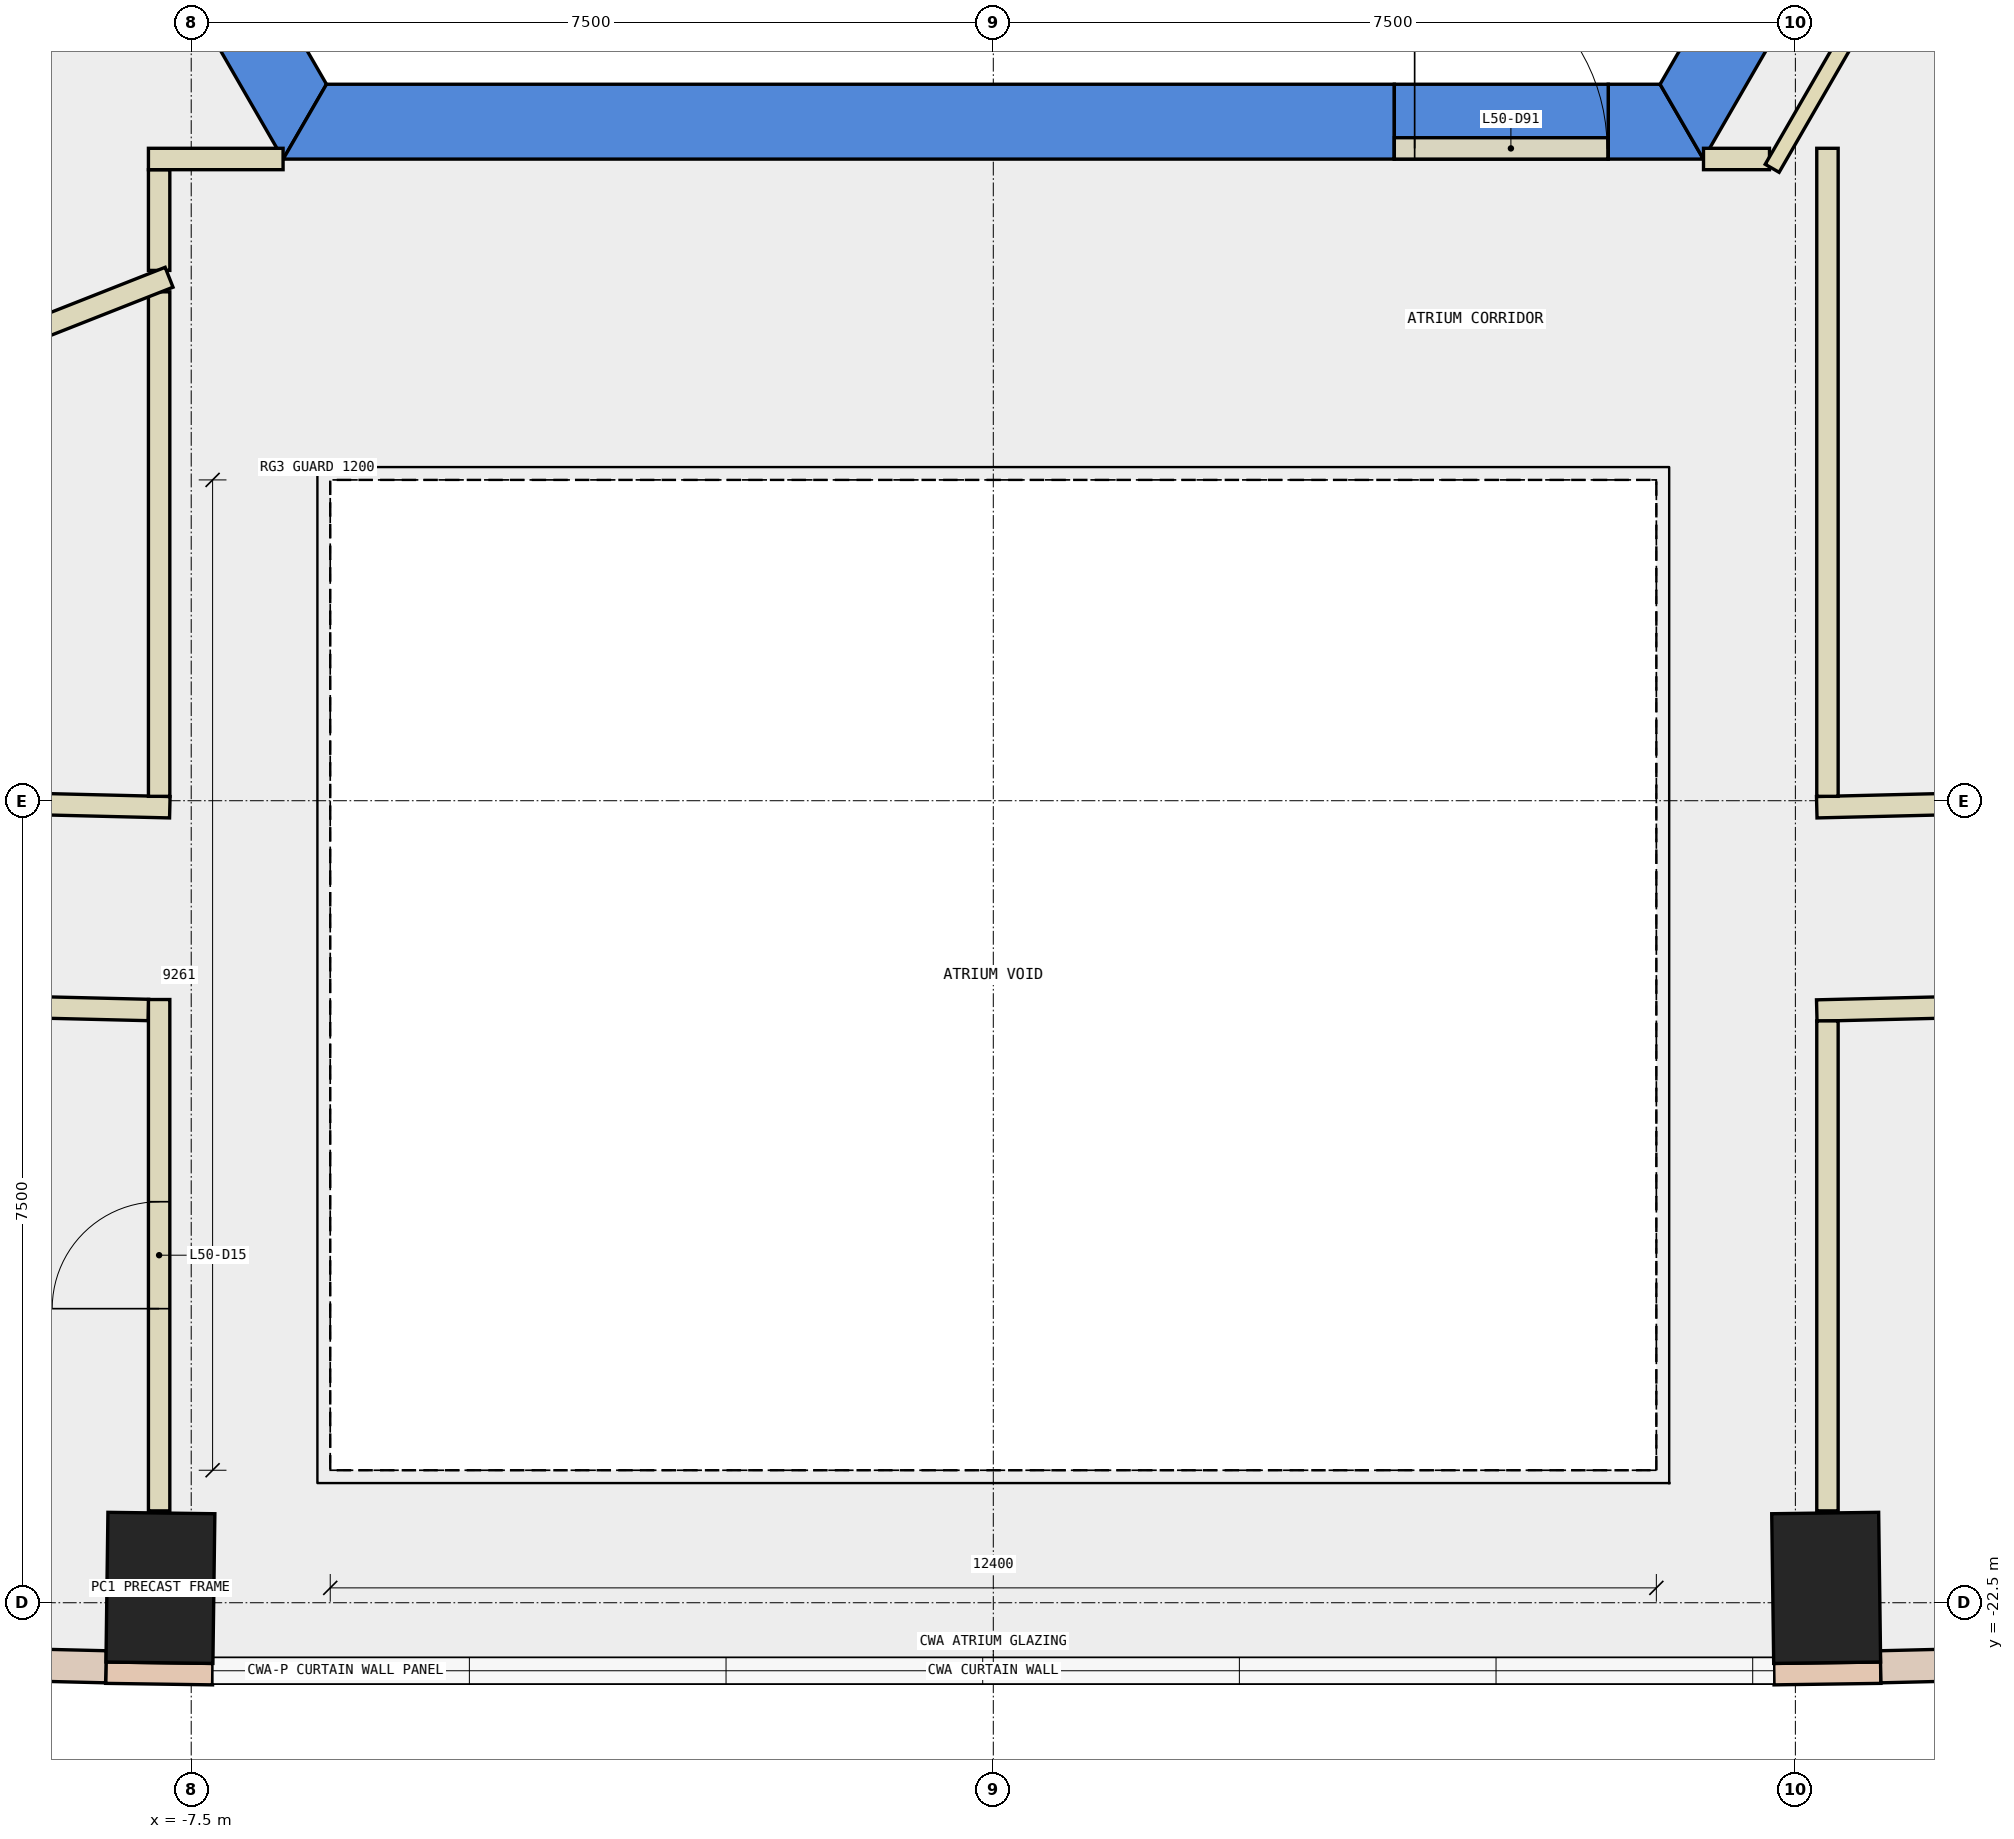
"""IFC4 building model, lengths in metres.
Left out: names, types, materials, properties, quantities, classifications, styles, units other than length and angle.
Written with IfcOpenShell. Run it as: python <this file> out.ifc"""

import sys

from ifc_helpers import new_model, si_unit, direction, frame, frame_2d, origin, origin_2d, place, context, subcontext, project, spatial, polyline, rectangle, outline, extrude, element, fill, save


model = new_model("IFC4")
c1 = context("Model", 3, precision=1e-05, world=origin(), true_north=direction((0.0, 1.0)))
c2 = subcontext(c1, "Body", "Model", "MODEL_VIEW")
j1 = project(units=[si_unit("LENGTHUNIT", "METRE"), si_unit("PLANEANGLEUNIT", "RADIAN")], contexts=[c1])
p1 = place(None, origin())
s1 = spatial("IfcSite", under=j1, at=p1, CompositionType="ELEMENT")
p2 = place(p1, origin())
s2 = spatial("IfcBuilding", under=s1, at=p2, CompositionType="ELEMENT")
p3 = place(p2, frame((0.0, 0.0, 223.4)))
s3 = spatial("IfcBuildingStorey", under=s2, at=p3, CompositionType="ELEMENT", Elevation=223.4)
for number, where, z_axis, x_axis in (
    (1, (-7.788, -22.361, -0.4), (0.0, 0.0, 1.0), (-1.0, 0.013, 0.0)),
    (2, (7.788, -22.361, -0.4), (0.0, 0.0, 1.0), (1.0, 0.013, 0.0)),
):
    element("IfcColumn", number, at=place(p3, frame(where, z_axis=z_axis, x_axis=x_axis)), inside=s3, PredefinedType="COLUMN", context=c2, shape_type="SweptSolid", body=[
        extrude(rectangle(XDim=1.0, YDim=1.4, at=origin_2d()), origin(), (0.0, 0.0, 1.0), 4.2),
    ])
p4 = place(p3, frame((0.0, 0.0, -0.4)))
e3 = element("IfcWall", 3, at=p4, inside=s3, PredefinedType="SHEAR", context=c2, shape_type="SweptSolid", body=[
    extrude(outline(polyline([(-13.279, 2.5), (-6.64, -9.0), (-6.235, -8.3), (-12.471, 2.5), (-13.279, 2.5)])), origin(), (0.0, 0.0, 1.0), 4.2),
])
p5 = place(p3, frame((0.0, 0.0, -0.4)))
e4 = element("IfcWall", 4, at=p5, inside=s3, PredefinedType="SHEAR", context=c2, shape_type="SweptSolid", body=[
    extrude(outline(polyline([(3.75, -9.0), (3.75, -8.3), (-6.235, -8.3), (-6.64, -9.0), (3.75, -9.0)])), origin(), (0.0, 0.0, 1.0), 4.2),
])
p6 = place(p3, frame((0.0, 0.0, -0.4)))
e5 = element("IfcWall", 5, at=p6, inside=s3, PredefinedType="SHEAR", context=c2, shape_type="SweptSolid", body=[
    extrude(outline(polyline([(5.75, -8.3), (5.75, -9.0), (6.64, -9.0), (6.235, -8.3), (5.75, -8.3)])), origin(), (0.0, 0.0, 1.0), 4.2),
])
p7 = place(p3, frame((0.0, 0.0, 3.6)))
e6 = element("IfcWall", 6, at=p7, inside=s3, PredefinedType="SHEAR", context=c2, shape_type="SweptSolid", body=[
    extrude(outline(polyline([(5.75, -9.0), (5.75, -8.3), (3.75, -8.3), (3.75, -9.0), (5.75, -9.0)])), origin(), (0.0, 0.0, 1.0), 0.2),
])
p8 = place(p3, frame((0.0, 0.0, -0.4)))
e7 = element("IfcWall", 7, at=p8, inside=s3, PredefinedType="SHEAR", context=c2, shape_type="SweptSolid", body=[
    extrude(outline(polyline([(6.64, -9.0), (13.279, 2.5), (12.471, 2.5), (6.235, -8.3), (6.64, -9.0)])), origin(), (0.0, 0.0, 1.0), 4.2),
])
for number, where, z_axis, x_axis in (
    (8, (8.877, -5.125, -0.4), (0.0, 0.0, 1.0), (0.866, -0.5, 0.0)),
    (9, (-8.877, -5.125, -0.4), (0.0, 0.0, 1.0), (-0.866, -0.5, 0.0)),
):
    element("IfcWall", number, at=place(p3, frame(where, z_axis=z_axis, x_axis=x_axis)), inside=s3, PredefinedType="SHEAR", context=c2, shape_type="SweptSolid", body=[
        extrude(rectangle(XDim=9.0, YDim=0.8, at=frame_2d((4.5, 0.0))), origin(), (0.0, 0.0, 1.0), 4.2),
    ])
for number, where, z_axis, x_axis in (
    (10, (-8.299, -23.154, 0.0), (0.0, 0.0, 1.0), (1.0, -0.014, 0.0)),
    (11, (7.299, -23.168, 0.0), (0.0, 0.0, 1.0), (1.0, 0.014, 0.0)),
):
    element("IfcWall", number, at=place(p3, frame(where, z_axis=z_axis, x_axis=x_axis)), inside=s3, PredefinedType="STANDARD", context=c2, shape_type="SweptSolid", body=[
        extrude(rectangle(XDim=1.0, YDim=0.2, at=frame_2d((0.5, 0.0))), origin(), (0.0, 0.0, 1.0), 3.8),
    ])
p9 = place(p3, frame((-13.681, -22.969, 0.0), z_axis=(0.0, 0.0, 1.0), x_axis=(0.999708030006, -0.024163086341, 0.0)))
e12 = element("IfcWall", 12, at=p9, inside=s3, PredefinedType="STANDARD", context=c2, shape_type="SweptSolid", body=[
    extrude(rectangle(XDim=5.385, YDim=0.3, at=frame_2d((2.693, 0.0))), origin(), (0.0, 0.0, 1.0), 3.8),
])
p10 = place(p9, frame((0.646, 0.0, 0.9)))
e13 = element("IfcOpeningElement", 13, at=p10, cuts=e12, PredefinedType="OPENING", context=c2, shape_type="SweptSolid", body=[
    extrude(rectangle(XDim=1.4, YDim=2.6, at=frame_2d((0.7, 1.3))), frame((0.0, 0.16, 0.0), z_axis=(0.0, -1.0, 0.0), x_axis=(1.0, 0.0, 0.0)), (0.0, 0.0, 1.0), 0.32),
])
p11 = place(p9, frame((3.339, 0.0, 0.9)))
e14 = element("IfcOpeningElement", 14, at=p11, cuts=e12, PredefinedType="OPENING", context=c2, shape_type="SweptSolid", body=[
    extrude(rectangle(XDim=1.4, YDim=2.6, at=frame_2d((0.7, 1.3))), frame((0.0, 0.16, 0.0), z_axis=(0.0, -1.0, 0.0), x_axis=(1.0, 0.0, 0.0)), (0.0, 0.0, 1.0), 0.32),
])
p12 = place(p3, frame((8.297, -23.099, 0.0), z_axis=(0.0, 0.0, 1.0), x_axis=(0.999708030006, 0.024163086341, 0.0)))
e15 = element("IfcWall", 15, at=p12, inside=s3, PredefinedType="STANDARD", context=c2, shape_type="SweptSolid", body=[
    extrude(rectangle(XDim=5.385, YDim=0.3, at=frame_2d((2.693, 0.0))), origin(), (0.0, 0.0, 1.0), 3.8),
])
p13 = place(p12, frame((0.646, 0.0, 0.9)))
e16 = element("IfcOpeningElement", 16, at=p13, cuts=e15, PredefinedType="OPENING", context=c2, shape_type="SweptSolid", body=[
    extrude(rectangle(XDim=1.4, YDim=2.6, at=frame_2d((0.7, 1.3))), frame((0.0, 0.16, 0.0), z_axis=(0.0, -1.0, 0.0), x_axis=(1.0, 0.0, 0.0)), (0.0, 0.0, 1.0), 0.32),
])
p14 = place(p12, frame((3.339, 0.0, 0.9)))
e17 = element("IfcOpeningElement", 17, at=p14, cuts=e15, PredefinedType="OPENING", context=c2, shape_type="SweptSolid", body=[
    extrude(rectangle(XDim=1.4, YDim=2.6, at=frame_2d((0.7, 1.3))), frame((0.0, 0.16, 0.0), z_axis=(0.0, -1.0, 0.0), x_axis=(1.0, 0.0, 0.0)), (0.0, 0.0, 1.0), 0.32),
])
p15 = place(p3, frame((7.7, -15.061, 0.0), z_axis=(0.0, 0.0, 1.0), x_axis=(0.999709615165, 0.024097413707, 0.0)))
e18 = element("IfcWall", 18, at=p15, inside=s3, PredefinedType="PARTITIONING", context=c2, shape_type="SweptSolid", body=[
    extrude(rectangle(XDim=6.231, YDim=0.2, at=frame_2d((3.115, 0.0))), origin(), (0.0, 0.0, 1.0), 3.8),
])
p16 = place(p15, frame((2.615, 0.0, 0.0)))
e19 = element("IfcOpeningElement", 19, at=p16, cuts=e18, PredefinedType="OPENING", context=c2, shape_type="SweptSolid", body=[
    extrude(rectangle(XDim=1.0, YDim=2.1, at=frame_2d((0.5, 1.05))), frame((0.0, 0.11, 0.0), z_axis=(0.0, -1.0, 0.0), x_axis=(1.0, 0.0, 0.0)), (0.0, 0.0, 1.0), 0.22),
])
p17 = place(p3, frame((-13.246, -14.927, 0.0), z_axis=(0.0, 0.0, 1.0), x_axis=(0.999708107757, -0.024159869312, 0.0)))
e20 = element("IfcWall", 20, at=p17, inside=s3, PredefinedType="PARTITIONING", context=c2, shape_type="SweptSolid", body=[
    extrude(rectangle(XDim=5.548, YDim=0.2, at=frame_2d((2.774, 0.0))), origin(), (0.0, 0.0, 1.0), 3.8),
])
p18 = place(p17, frame((2.274, 0.0, 0.0)))
e21 = element("IfcOpeningElement", 21, at=p18, cuts=e20, PredefinedType="OPENING", context=c2, shape_type="SweptSolid", body=[
    extrude(rectangle(XDim=1.0, YDim=2.1, at=frame_2d((0.5, 1.05))), frame((0.0, 0.11, 0.0), z_axis=(0.0, -1.0, 0.0), x_axis=(1.0, 0.0, 0.0)), (0.0, 0.0, 1.0), 0.22),
])
p19 = place(p3, frame((14.063, -16.808, 0.0), z_axis=(0.0, 0.0, 1.0), x_axis=(-0.999707980382, -0.024165139379, 0.0)))
e22 = element("IfcWall", 22, at=p19, inside=s3, PredefinedType="PARTITIONING", context=c2, shape_type="SweptSolid", body=[
    extrude(rectangle(XDim=6.365, YDim=0.2, at=frame_2d((3.183, 0.0))), origin(), (0.0, 0.0, 1.0), 3.8),
])
p20 = place(p19, frame((2.683, 0.0, 0.0)))
e23 = element("IfcOpeningElement", 23, at=p20, cuts=e22, PredefinedType="OPENING", context=c2, shape_type="SweptSolid", body=[
    extrude(rectangle(XDim=1.0, YDim=2.1, at=frame_2d((0.5, 1.05))), frame((0.0, 0.11, 0.0), z_axis=(0.0, -1.0, 0.0), x_axis=(1.0, 0.0, 0.0)), (0.0, 0.0, 1.0), 0.22),
])
p21 = place(p3, frame((-7.9, -16.957, 0.0), z_axis=(0.0, 0.0, 1.0), x_axis=(-0.999709338637, 0.024108883071, 0.0)))
e24 = element("IfcWall", 24, at=p21, inside=s3, PredefinedType="PARTITIONING", context=c2, shape_type="SweptSolid", body=[
    extrude(rectangle(XDim=2.866, YDim=0.2, at=frame_2d((1.433, 0.0))), origin(), (0.0, 0.0, 1.0), 3.8),
])
p22 = place(p3, frame((6.641, -8.999, 0.0), z_axis=(0.0, 0.0, 1.0), x_axis=(1.0, 0.0, 0.0)))
e25 = element("IfcWall", 25, at=p22, inside=s3, PredefinedType="PARTITIONING", context=c2, shape_type="SweptSolid", body=[
    extrude(rectangle(XDim=0.617, YDim=0.2, at=frame_2d((0.309, 0.0))), origin(), (0.0, 0.0, 1.0), 3.8),
])
p23 = place(p3, frame((7.283, -9.086, 0.0), z_axis=(0.0, 0.0, 1.0), x_axis=(0.500035303972, 0.866005020067, 0.0)))
e26 = element("IfcWall", 26, at=p23, inside=s3, PredefinedType="PARTITIONING", context=c2, shape_type="SweptSolid", body=[
    extrude(rectangle(XDim=3.828, YDim=0.15, at=frame_2d((1.914, 0.0))), origin(), (0.0, 0.0, 1.0), 3.8),
])
p24 = place(p3, frame((7.8, -8.899, 0.0), z_axis=(0.0, 0.0, 1.0), x_axis=(0.0, -1.0, 0.0)))
e27 = element("IfcWall", 27, at=p24, inside=s3, PredefinedType="PARTITIONING", context=c2, shape_type="SweptSolid", body=[
    extrude(rectangle(XDim=6.06, YDim=0.2, at=frame_2d((3.03, 0.0))), origin(), (0.0, 0.0, 1.0), 3.8),
])
p25 = place(p3, frame((-7.8, -10.041, 0.0), z_axis=(0.0, 0.0, 1.0), x_axis=(0.0, 1.0, 0.0)))
e28 = element("IfcWall", 28, at=p25, inside=s3, PredefinedType="PARTITIONING", context=c2, shape_type="SweptSolid", body=[
    extrude(rectangle(XDim=0.942, YDim=0.2, at=frame_2d((0.471, 0.0))), origin(), (0.0, 0.0, 1.0), 3.8),
])
p26 = place(p3, frame((-7.9, -8.999, 0.0), z_axis=(0.0, 0.0, 1.0), x_axis=(1.0, 0.0, 0.0)))
e29 = element("IfcWall", 29, at=p26, inside=s3, PredefinedType="PARTITIONING", context=c2, shape_type="SweptSolid", body=[
    extrude(rectangle(XDim=1.259, YDim=0.2, at=frame_2d((0.629, 0.0))), origin(), (0.0, 0.0, 1.0), 3.8),
])
p27 = place(p3, frame((-7.8, -14.959, 0.0), z_axis=(0.0, 0.0, 1.0), x_axis=(0.0, 1.0, 0.0)))
e30 = element("IfcWall", 30, at=p27, inside=s3, PredefinedType="PARTITIONING", context=c2, shape_type="SweptSolid", body=[
    extrude(rectangle(XDim=4.718, YDim=0.2, at=frame_2d((2.359, 0.0))), origin(), (0.0, 0.0, 1.0), 3.8),
])
p28 = place(p3, frame((7.8, -17.059, 0.0), z_axis=(0.0, 0.0, 1.0), x_axis=(0.0, -1.0, 0.0)))
e31 = element("IfcWall", 31, at=p28, inside=s3, PredefinedType="PARTITIONING", context=c2, shape_type="SweptSolid", body=[
    extrude(rectangle(XDim=4.582, YDim=0.2, at=frame_2d((2.291, 0.0))), origin(), (0.0, 0.0, 1.0), 3.8),
])
p29 = place(p3, frame((-7.8, -21.641, 0.0), z_axis=(0.0, 0.0, 1.0), x_axis=(0.0, 1.0, 0.0)))
e32 = element("IfcWall", 32, at=p29, inside=s3, PredefinedType="PARTITIONING", context=c2, shape_type="SweptSolid", body=[
    extrude(rectangle(XDim=4.782, YDim=0.2, at=frame_2d((2.391, 0.0))), origin(), (0.0, 0.0, 1.0), 3.8),
])
p30 = place(p29, frame((1.891, 0.0, 0.0)))
e33 = element("IfcOpeningElement", 33, at=p30, cuts=e32, PredefinedType="OPENING", context=c2, shape_type="SweptSolid", body=[
    extrude(rectangle(XDim=1.0, YDim=2.1, at=frame_2d((0.5, 1.05))), frame((0.0, 0.11, 0.0), z_axis=(0.0, -1.0, 0.0), x_axis=(1.0, 0.0, 0.0)), (0.0, 0.0, 1.0), 0.22),
])
p31 = place(p3, frame((-7.707, -10.105, 0.0), z_axis=(0.0, 0.0, 1.0), x_axis=(-0.930316800812, -0.36675693603, 0.0)))
e34 = element("IfcWall", 34, at=p31, inside=s3, PredefinedType="PARTITIONING", context=c2, shape_type="SweptSolid", body=[
    extrude(rectangle(XDim=7.302, YDim=0.2, at=frame_2d((3.651, 0.0))), origin(), (0.0, 0.0, 1.0), 3.8),
])
p32 = place(p3, frame((3.75, -8.9, 0.0), z_axis=(0.0, 0.0, 1.0), x_axis=(1.0, 0.0, 0.0)))
e35 = element("IfcWall", 35, at=p32, inside=s3, PredefinedType="PARTITIONING", context=c2, shape_type="SweptSolid", body=[
    extrude(rectangle(XDim=2.0, YDim=0.2, at=frame_2d((1.0, 0.0))), origin(), (0.0, 0.0, 1.0), 2.4),
])
p33 = place(p32, frame((0.19, 0.0, 0.0)))
e36 = element("IfcOpeningElement", 36, at=p33, cuts=e35, PredefinedType="OPENING", context=c2, shape_type="SweptSolid", body=[
    extrude(rectangle(XDim=1.8, YDim=2.1, at=frame_2d((0.9, 1.05))), frame((0.0, 0.11, 0.0), z_axis=(0.0, -1.0, 0.0), x_axis=(1.0, 0.0, 0.0)), (0.0, 0.0, 1.0), 0.22),
])
p34 = place(p30, origin())
e37 = element("IfcDoor", 37, at=p34, inside=s3, OperationType="SINGLE_SWING_LEFT", PredefinedType="DOOR", context=c2, shape_type="SweptSolid", body=[
    extrude(rectangle(XDim=1.0, YDim=2.1, at=frame_2d((0.5, 1.05))), frame((0.0, 0.025, 0.0), z_axis=(0.0, -1.0, 0.0), x_axis=(1.0, 0.0, 0.0)), (0.0, 0.0, 1.0), 0.05),
])
fill(e33, e37)
p35 = place(p33, origin())
e38 = element("IfcDoor", 38, at=p35, inside=s3, OperationType="DOUBLE_DOOR_SINGLE_SWING", PredefinedType="DOOR", context=c2, shape_type="SweptSolid", body=[
    extrude(rectangle(XDim=1.8, YDim=2.1, at=frame_2d((0.9, 1.05))), frame((0.0, 0.025, 0.0), z_axis=(0.0, -1.0, 0.0), x_axis=(1.0, 0.0, 0.0)), (0.0, 0.0, 1.0), 0.05),
])
fill(e36, e38)
save(model, sys.argv[1])
